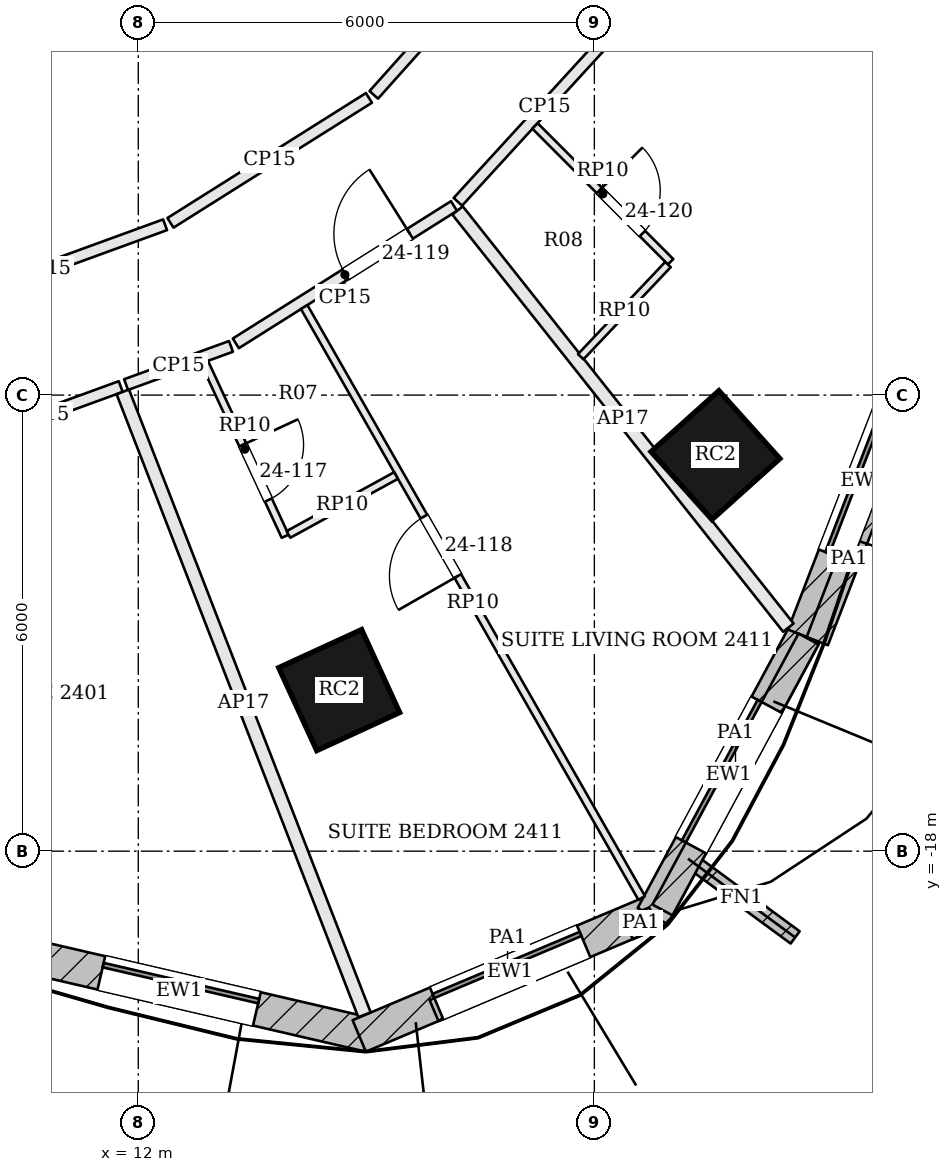
"""IFC4 building model, lengths in metres.
Left out: names, types, materials, properties, quantities, classifications, styles, units other than length and angle.
Written with IfcOpenShell. Run it as: python <this file> out.ifc"""

import sys

from ifc_helpers import new_model, si_unit, direction, frame, frame_2d, origin, origin_2d, place, context, subcontext, project, spatial, rectangle, extrude, element, fill, save


model = new_model("IFC4")
c1 = context("Model", 3, precision=1e-05, world=origin(), true_north=direction((0.0, 1.0)))
c2 = subcontext(c1, "Body", "Model", "MODEL_VIEW")
j1 = project(units=[si_unit("LENGTHUNIT", "METRE"), si_unit("PLANEANGLEUNIT", "RADIAN")], contexts=[c1])
p1 = place(None, origin())
s1 = spatial("IfcSite", under=j1, at=p1, CompositionType="ELEMENT")
p2 = place(p1, origin())
s2 = spatial("IfcBuilding", under=s1, at=p2, CompositionType="ELEMENT")
p3 = place(p2, frame((0.0, 0.0, 103.2)))
s3 = spatial("IfcBuildingStorey", under=s2, at=p3, CompositionType="ELEMENT", Elevation=103.2)
for number, where, z_axis, x_axis in (
    (1, (14.643, -15.881, 0.0), (0.0, 0.0, 1.0), (0.909, 0.417, 0.0)),
    (2, (19.593, -12.79, 0.0), (0.0, 0.0, 1.0), (0.744, 0.668, 0.0)),
):
    element("IfcColumn", number, at=place(p3, frame(where, z_axis=z_axis, x_axis=x_axis)), inside=s3, PredefinedType="COLUMN", context=c2, shape_type="SweptSolid", body=[
        extrude(rectangle(XDim=1.2, YDim=1.2, at=origin_2d()), origin(), (0.0, 0.0, 1.0), 3.6),
    ])
p4 = place(p3, frame((10.034, -19.259, 0.0), z_axis=(0.0, 0.0, 1.0), x_axis=(0.974223567844, -0.225584662283, 0.0)))
e3 = element("IfcWall", 3, at=p4, inside=s3, PredefinedType="SOLIDWALL", context=c2, shape_type="SweptSolid", body=[
    extrude(rectangle(XDim=5.139, YDim=0.45, at=frame_2d((2.569, 0.0))), origin(), (0.0, 0.0, 1.0), 3.4),
])
p5 = place(p4, frame((1.519, 0.0, 0.9)))
e4 = element("IfcOpeningElement", 4, at=p5, cuts=e3, PredefinedType="OPENING", context=c2, shape_type="SweptSolid", body=[
    extrude(rectangle(XDim=2.1, YDim=2.0, at=frame_2d((1.05, 1.0))), frame((0.0, 0.235, 0.0), z_axis=(0.0, -1.0, 0.0), x_axis=(1.0, 0.0, 0.0)), (0.0, 0.0, 1.0), 0.47),
])
p6 = place(p3, frame((14.906, -20.431, 0.0), z_axis=(0.0, 0.0, 1.0), x_axis=(0.921435803521, 0.388530642279, 0.0)))
e5 = element("IfcWall", 5, at=p6, inside=s3, PredefinedType="SOLIDWALL", context=c2, shape_type="SweptSolid", body=[
    extrude(rectangle(XDim=4.309, YDim=0.45, at=frame_2d((2.154, 0.0))), origin(), (0.0, 0.0, 1.0), 3.4),
])
p7 = place(p6, frame((1.104, 0.0, 0.9)))
e6 = element("IfcOpeningElement", 6, at=p7, cuts=e5, PredefinedType="OPENING", context=c2, shape_type="SweptSolid", body=[
    extrude(rectangle(XDim=2.1, YDim=2.0, at=frame_2d((1.05, 1.0))), frame((0.0, 0.235, 0.0), z_axis=(0.0, -1.0, 0.0), x_axis=(1.0, 0.0, 0.0)), (0.0, 0.0, 1.0), 0.47),
])
p8 = place(p3, frame((18.767, -18.854, 0.0), z_axis=(0.0, 0.0, 1.0), x_axis=(0.474475888716, 0.880268499395, 0.0)))
e7 = element("IfcWall", 7, at=p8, inside=s3, PredefinedType="SOLIDWALL", context=c2, shape_type="SweptSolid", body=[
    extrude(rectangle(XDim=4.219, YDim=0.45, at=frame_2d((2.11, 0.0))), origin(), (0.0, 0.0, 1.0), 3.4),
])
p9 = place(p8, frame((1.06, 0.0, 0.9)))
e8 = element("IfcOpeningElement", 8, at=p9, cuts=e7, PredefinedType="OPENING", context=c2, shape_type="SweptSolid", body=[
    extrude(rectangle(XDim=2.1, YDim=2.0, at=frame_2d((1.05, 1.0))), frame((0.0, 0.235, 0.0), z_axis=(0.0, -1.0, 0.0), x_axis=(1.0, 0.0, 0.0)), (0.0, 0.0, 1.0), 0.47),
])
p10 = place(p3, frame((20.757, -15.166, 0.0), z_axis=(0.0, 0.0, 1.0), x_axis=(0.360067043581, 0.932926430179, 0.0)))
e9 = element("IfcWall", 9, at=p10, inside=s3, PredefinedType="SOLIDWALL", context=c2, shape_type="SweptSolid", body=[
    extrude(rectangle(XDim=4.36, YDim=0.45, at=frame_2d((2.18, 0.0))), origin(), (0.0, 0.0, 1.0), 3.4),
])
p11 = place(p10, frame((1.13, 0.0, 0.9)))
e10 = element("IfcOpeningElement", 10, at=p11, cuts=e9, PredefinedType="OPENING", context=c2, shape_type="SweptSolid", body=[
    extrude(rectangle(XDim=2.1, YDim=2.0, at=frame_2d((1.05, 1.0))), frame((0.0, 0.235, 0.0), z_axis=(0.0, -1.0, 0.0), x_axis=(1.0, 0.0, 0.0)), (0.0, 0.0, 1.0), 0.47),
])
p12 = place(p3, frame((19.231, -18.099, 0.0), z_axis=(0.0, 0.0, 1.0), x_axis=(0.806085538754, -0.591799040394, 0.0)))
e11 = element("IfcWall", 11, at=p12, inside=s3, PredefinedType="SOLIDWALL", context=c2, shape_type="SweptSolid", body=[
    extrude(rectangle(XDim=1.75, YDim=0.2, at=frame_2d((0.875, 0.0))), origin(), (0.0, 0.0, 1.0), 3.4),
])
p13 = place(p3, frame((15.891, -20.097, 3.6), z_axis=(0.0, 0.0, 1.0), x_axis=(0.921468908678, 0.388452121038, 0.0)))
e12 = element("IfcWall", 12, at=p13, inside=s3, PredefinedType="PARAPET", context=c2, shape_type="SweptSolid", body=[
    extrude(rectangle(XDim=2.099, YDim=0.3, at=frame_2d((1.05, 0.0))), origin(), (0.0, 0.0, 1.0), 1.1),
])
p14 = place(p3, frame((18.446, -19.02, 3.6), z_axis=(0.0, 0.0, 1.0), x_axis=(0.921356634102, 0.388718346358, 0.0)))
e13 = element("IfcWall", 13, at=p14, inside=s3, PredefinedType="PARAPET", context=c2, shape_type="SweptSolid", body=[
    extrude(rectangle(XDim=0.363, YDim=0.3, at=frame_2d((0.182, 0.0))), origin(), (0.0, 0.0, 1.0), 1.1),
])
p15 = place(p3, frame((18.896, -18.773, 3.6), z_axis=(0.0, 0.0, 1.0), x_axis=(0.474444905835, 0.880285198857, 0.0)))
e14 = element("IfcWall", 14, at=p15, inside=s3, PredefinedType="PARAPET", context=c2, shape_type="SweptSolid", body=[
    extrude(rectangle(XDim=4.05, YDim=0.3, at=frame_2d((2.025, 0.0))), origin(), (0.0, 0.0, 1.0), 1.1),
])
p16 = place(p3, frame((20.933, -15.237, 3.6), z_axis=(0.0, 0.0, 1.0), x_axis=(0.360021038217, 0.932944184848, 0.0)))
e15 = element("IfcWall", 15, at=p16, inside=s3, PredefinedType="PARAPET", context=c2, shape_type="SweptSolid", body=[
    extrude(rectangle(XDim=2.323, YDim=0.3, at=frame_2d((1.162, 0.0))), origin(), (0.0, 0.0, 1.0), 1.1),
])
p17 = place(p3, frame((9.728, -12.631, 0.0), z_axis=(0.0, 0.0, 1.0), x_axis=(0.939625968265, 0.342203214133, 0.0)))
e16 = element("IfcWall", 16, at=p17, inside=s3, PredefinedType="PARTITIONING", context=c2, shape_type="SweptSolid", body=[
    extrude(rectangle(XDim=2.172, YDim=0.15, at=frame_2d((1.086, 0.0))), origin(), (0.0, 0.0, 1.0), 2.784),
])
p18 = place(p3, frame((14.976, -20.153, 0.0), z_axis=(0.0, 0.0, 1.0), x_axis=(-0.361741189075, 0.932278559298, 0.0)))
e17 = element("IfcWall", 17, at=p18, inside=s3, PredefinedType="PARTITIONING", context=c2, shape_type="SweptSolid", body=[
    extrude(rectangle(XDim=8.791, YDim=0.175, at=frame_2d((4.395, 0.0))), origin(), (0.0, 0.0, 1.0), 2.784),
])
p19 = place(p3, frame((11.839, -11.862, 0.0), z_axis=(0.0, 0.0, 1.0), x_axis=(0.939613732968, 0.342236808099, 0.0)))
e18 = element("IfcWall", 18, at=p19, inside=s3, PredefinedType="PARTITIONING", context=c2, shape_type="SweptSolid", body=[
    extrude(rectangle(XDim=1.469, YDim=0.15, at=frame_2d((0.734, 0.0))), origin(), (0.0, 0.0, 1.0), 2.784),
])
p20 = place(p3, frame((13.283, -11.319, 0.0), z_axis=(0.0, 0.0, 1.0), x_axis=(0.846324171878, 0.532668185736, 0.0)))
e19 = element("IfcWall", 19, at=p20, inside=s3, PredefinedType="PARTITIONING", context=c2, shape_type="SweptSolid", body=[
    extrude(rectangle(XDim=3.392, YDim=0.15, at=frame_2d((1.696, 0.0))), origin(), (0.0, 0.0, 1.0), 2.784),
])
p21 = place(p20, frame((1.706, 0.0, 0.0)))
e20 = element("IfcOpeningElement", 20, at=p21, cuts=e19, PredefinedType="OPENING", context=c2, shape_type="SweptSolid", body=[
    extrude(rectangle(XDim=1.0, YDim=2.1, at=frame_2d((0.5, 1.05))), frame((0.0, 0.085, 0.0), z_axis=(0.0, -1.0, 0.0), x_axis=(1.0, 0.0, 0.0)), (0.0, 0.0, 1.0), 0.17),
])
p22 = place(p3, frame((20.553, -15.059, 0.0), z_axis=(0.0, 0.0, 1.0), x_axis=(-0.621391021986, 0.783500604847, 0.0)))
e21 = element("IfcWall", 21, at=p22, inside=s3, PredefinedType="PARTITIONING", context=c2, shape_type="SweptSolid", body=[
    extrude(rectangle(XDim=7.004, YDim=0.175, at=frame_2d((3.502, 0.0))), origin(), (0.0, 0.0, 1.0), 2.784),
])
p23 = place(p3, frame((16.204, -9.457, 0.0), z_axis=(0.0, 0.0, 1.0), x_axis=(0.674966689319, 0.737848201401, 0.0)))
e22 = element("IfcWall", 22, at=p23, inside=s3, PredefinedType="PARTITIONING", context=c2, shape_type="SweptSolid", body=[
    extrude(rectangle(XDim=3.385, YDim=0.15, at=frame_2d((1.693, 0.0))), origin(), (0.0, 0.0, 1.0), 2.784),
])
p24 = place(p3, frame((16.925, -6.009, 0.0), z_axis=(0.0, 0.0, 1.0), x_axis=(-0.666893859891, -0.745152722359, 0.0)))
e23 = element("IfcWall", 23, at=p24, inside=s3, PredefinedType="PARTITIONING", context=c2, shape_type="SweptSolid", body=[
    extrude(rectangle(XDim=2.739, YDim=0.15, at=frame_2d((1.37, 0.0))), origin(), (0.0, 0.0, 1.0), 2.784),
])
p25 = place(p3, frame((15.034, -8.09, 0.0), z_axis=(0.0, 0.0, 1.0), x_axis=(-0.846322679414, -0.532670557014, 0.0)))
e24 = element("IfcWall", 24, at=p25, inside=s3, PredefinedType="PARTITIONING", context=c2, shape_type="SweptSolid", body=[
    extrude(rectangle(XDim=3.085, YDim=0.15, at=frame_2d((1.543, 0.0))), origin(), (0.0, 0.0, 1.0), 2.784),
])
p26 = place(p3, frame((12.353, -9.76, 0.0), z_axis=(0.0, 0.0, 1.0), x_axis=(-0.939632450309, -0.342185415127, 0.0)))
e25 = element("IfcWall", 25, at=p26, inside=s3, PredefinedType="PARTITIONING", context=c2, shape_type="SweptSolid", body=[
    extrude(rectangle(XDim=3.368, YDim=0.15, at=frame_2d((1.684, 0.0))), origin(), (0.0, 0.0, 1.0), 2.784),
])
p27 = place(p3, frame((18.622, -18.615, 0.0), z_axis=(0.0, 0.0, 1.0), x_axis=(-0.495924530613, 0.868365625723, 0.0)))
e26 = element("IfcWall", 26, at=p27, inside=s3, PredefinedType="PARTITIONING", context=c2, shape_type="SweptSolid", body=[
    extrude(rectangle(XDim=8.952, YDim=0.1, at=frame_2d((4.476, 0.0))), origin(), (0.0, 0.0, 1.0), 2.784),
])
p28 = place(p27, frame((4.877, 0.0, 0.0)))
e27 = element("IfcOpeningElement", 27, at=p28, cuts=e26, PredefinedType="OPENING", context=c2, shape_type="SweptSolid", body=[
    extrude(rectangle(XDim=0.9, YDim=2.4, at=frame_2d((0.45, 1.2))), frame((0.0, 0.06, 0.0), z_axis=(0.0, -1.0, 0.0), x_axis=(1.0, 0.0, 0.0)), (0.0, 0.0, 1.0), 0.12),
])
p29 = place(p3, frame((12.87, -11.566, 0.0), z_axis=(0.0, 0.0, 1.0), x_axis=(0.42076187936, -0.907171119953, 0.0)))
e28 = element("IfcWall", 28, at=p29, inside=s3, PredefinedType="PARTITIONING", context=c2, shape_type="SweptSolid", body=[
    extrude(rectangle(XDim=2.525, YDim=0.1, at=frame_2d((1.263, 0.0))), origin(), (0.0, 0.0, 1.0), 2.784),
])
p30 = place(p29, frame((1.2, 0.0, 0.0)))
e29 = element("IfcOpeningElement", 29, at=p30, cuts=e28, PredefinedType="OPENING", context=c2, shape_type="SweptSolid", body=[
    extrude(rectangle(XDim=0.8, YDim=2.1, at=frame_2d((0.4, 1.05))), frame((0.0, 0.06, 0.0), z_axis=(0.0, -1.0, 0.0), x_axis=(1.0, 0.0, 0.0)), (0.0, 0.0, 1.0), 0.12),
])
p31 = place(p3, frame((13.976, -13.833, 0.0), z_axis=(0.0, 0.0, 1.0), x_axis=(0.877160016476, 0.480198193975, 0.0)))
e30 = element("IfcWall", 30, at=p31, inside=s3, PredefinedType="PARTITIONING", context=c2, shape_type="SweptSolid", body=[
    extrude(rectangle(XDim=1.613, YDim=0.1, at=frame_2d((0.807, 0.0))), origin(), (0.0, 0.0, 1.0), 2.784),
])
p32 = place(p3, frame((17.219, -8.459, 0.0), z_axis=(0.0, 0.0, 1.0), x_axis=(0.706526392877, -0.707686693508, 0.0)))
e31 = element("IfcWall", 31, at=p32, inside=s3, PredefinedType="PARTITIONING", context=c2, shape_type="SweptSolid", body=[
    extrude(rectangle(XDim=2.525, YDim=0.1, at=frame_2d((1.262, 0.0))), origin(), (0.0, 0.0, 1.0), 2.784),
])
p33 = place(p32, frame((1.2, 0.0, 0.0)))
e32 = element("IfcOpeningElement", 32, at=p33, cuts=e31, PredefinedType="OPENING", context=c2, shape_type="SweptSolid", body=[
    extrude(rectangle(XDim=0.8, YDim=2.1, at=frame_2d((0.4, 1.05))), frame((0.0, 0.06, 0.0), z_axis=(0.0, -1.0, 0.0), x_axis=(1.0, 0.0, 0.0)), (0.0, 0.0, 1.0), 0.12),
])
p34 = place(p3, frame((18.969, -10.282, 0.0), z_axis=(0.0, 0.0, 1.0), x_axis=(-0.687322860116, -0.726352039965, 0.0)))
e33 = element("IfcWall", 33, at=p34, inside=s3, PredefinedType="PARTITIONING", context=c2, shape_type="SweptSolid", body=[
    extrude(rectangle(XDim=1.67, YDim=0.1, at=frame_2d((0.835, 0.0))), origin(), (0.0, 0.0, 1.0), 2.784),
])
p35 = place(p5, origin())
e34 = element("IfcWindow", 34, at=p35, inside=s3, PartitioningType="SINGLE_PANEL", PredefinedType="WINDOW", context=c2, shape_type="SweptSolid", body=[
    extrude(rectangle(XDim=2.1, YDim=2.0, at=frame_2d((1.05, 1.0))), frame((0.0, 0.135, 0.0), z_axis=(0.0, -1.0, 0.0), x_axis=(1.0, 0.0, 0.0)), (0.0, 0.0, 1.0), 0.06),
])
fill(e4, e34)
p36 = place(p7, origin())
e35 = element("IfcWindow", 35, at=p36, inside=s3, PartitioningType="SINGLE_PANEL", PredefinedType="WINDOW", context=c2, shape_type="SweptSolid", body=[
    extrude(rectangle(XDim=2.1, YDim=2.0, at=frame_2d((1.05, 1.0))), frame((0.0, 0.135, 0.0), z_axis=(0.0, -1.0, 0.0), x_axis=(1.0, 0.0, 0.0)), (0.0, 0.0, 1.0), 0.06),
])
fill(e6, e35)
p37 = place(p9, origin())
e36 = element("IfcWindow", 36, at=p37, inside=s3, PartitioningType="SINGLE_PANEL", PredefinedType="WINDOW", context=c2, shape_type="SweptSolid", body=[
    extrude(rectangle(XDim=2.1, YDim=2.0, at=frame_2d((1.05, 1.0))), frame((0.0, 0.135, 0.0), z_axis=(0.0, -1.0, 0.0), x_axis=(1.0, 0.0, 0.0)), (0.0, 0.0, 1.0), 0.06),
])
fill(e8, e36)
p38 = place(p11, origin())
e37 = element("IfcWindow", 37, at=p38, inside=s3, PartitioningType="SINGLE_PANEL", PredefinedType="WINDOW", context=c2, shape_type="SweptSolid", body=[
    extrude(rectangle(XDim=2.1, YDim=2.0, at=frame_2d((1.05, 1.0))), frame((0.0, 0.135, 0.0), z_axis=(0.0, -1.0, 0.0), x_axis=(1.0, 0.0, 0.0)), (0.0, 0.0, 1.0), 0.06),
])
fill(e10, e37)
p39 = place(p30, origin())
e38 = element("IfcDoor", 38, at=p39, inside=s3, OperationType="SINGLE_SWING_LEFT", PredefinedType="DOOR", context=c2, shape_type="SweptSolid", body=[
    extrude(rectangle(XDim=0.8, YDim=2.1, at=frame_2d((0.4, 1.05))), frame((0.0, 0.025, 0.0), z_axis=(0.0, -1.0, 0.0), x_axis=(1.0, 0.0, 0.0)), (0.0, 0.0, 1.0), 0.05),
])
fill(e29, e38)
p40 = place(p28, origin())
e39 = element("IfcDoor", 39, at=p40, inside=s3, OperationType="SINGLE_SWING_LEFT", PredefinedType="DOOR", context=c2, shape_type="SweptSolid", body=[
    extrude(rectangle(XDim=0.9, YDim=2.4, at=frame_2d((0.45, 1.2))), frame((0.0, 0.025, 0.0), z_axis=(0.0, -1.0, 0.0), x_axis=(1.0, 0.0, 0.0)), (0.0, 0.0, 1.0), 0.05),
])
fill(e27, e39)
p41 = place(p21, origin())
e40 = element("IfcDoor", 40, at=p41, inside=s3, OperationType="SINGLE_SWING_RIGHT", PredefinedType="DOOR", context=c2, shape_type="SweptSolid", body=[
    extrude(rectangle(XDim=1.0, YDim=2.1, at=frame_2d((0.5, 1.05))), frame((0.0, 0.025, 0.0), z_axis=(0.0, -1.0, 0.0), x_axis=(1.0, 0.0, 0.0)), (0.0, 0.0, 1.0), 0.05),
])
fill(e20, e40)
p42 = place(p33, origin())
e41 = element("IfcDoor", 41, at=p42, inside=s3, OperationType="SINGLE_SWING_LEFT", PredefinedType="DOOR", context=c2, shape_type="SweptSolid", body=[
    extrude(rectangle(XDim=0.8, YDim=2.1, at=frame_2d((0.4, 1.05))), frame((0.0, 0.025, 0.0), z_axis=(0.0, -1.0, 0.0), x_axis=(1.0, 0.0, 0.0)), (0.0, 0.0, 1.0), 0.05),
])
fill(e32, e41)
save(model, sys.argv[1])
